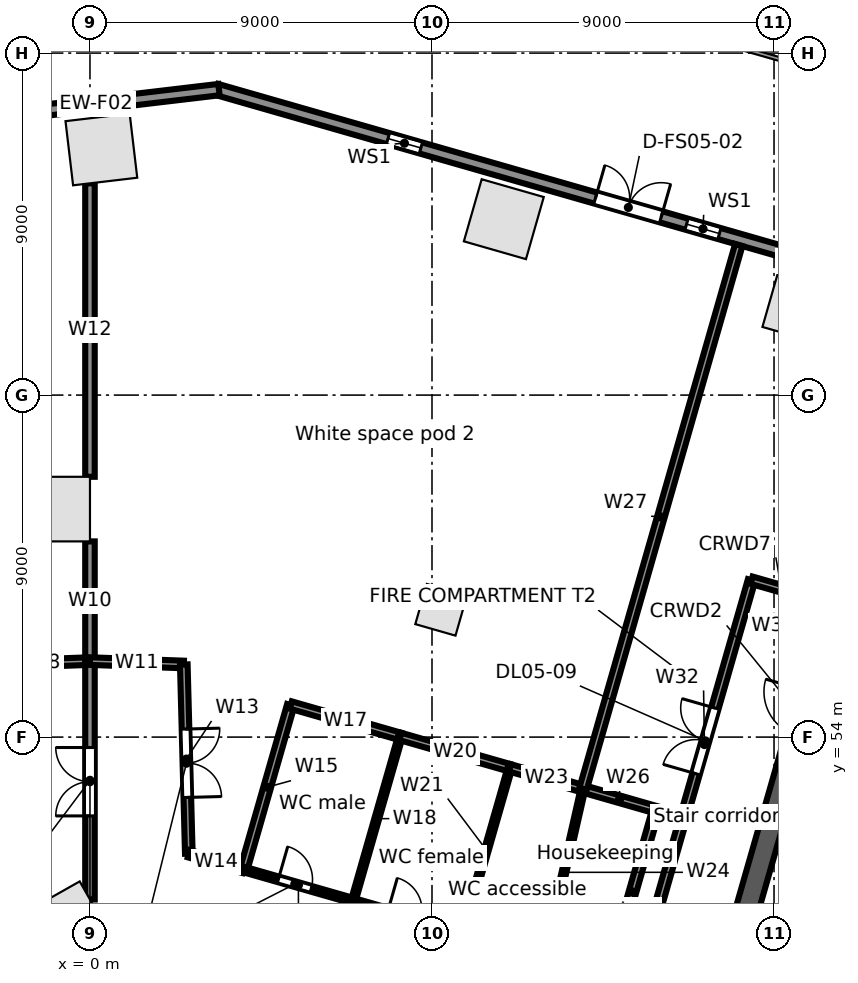
"""IFC4 building model, lengths in metres.
Left out: names, types, materials, properties, quantities, classifications, styles, units other than length and angle.
Written with IfcOpenShell. Run it as: python <this file> out.ifc"""

import sys

from ifc_helpers import new_model, si_unit, direction, frame, frame_2d, origin, origin_2d, place, context, subcontext, project, spatial, rectangle, extrude, element, fill, save


model = new_model("IFC4")
c1 = context("Model", 3, precision=1e-05, world=origin(), true_north=direction((0.0, 1.0)))
c2 = subcontext(c1, "Body", "Model", "MODEL_VIEW")
j1 = project(units=[si_unit("LENGTHUNIT", "METRE"), si_unit("PLANEANGLEUNIT", "RADIAN")], contexts=[c1])
p1 = place(None, origin())
s1 = spatial("IfcSite", under=j1, at=p1, CompositionType="ELEMENT")
p2 = place(p1, origin())
s2 = spatial("IfcBuilding", under=s1, at=p2, CompositionType="ELEMENT")
p3 = place(p2, frame((0.0, 0.0, 26.5)))
s3 = spatial("IfcBuildingStorey", under=s2, at=p3, CompositionType="ELEMENT", Elevation=26.5)
for number, where, z_axis, x_axis in (
    (1, (18.746, 65.376, 0.0), (0.0, 0.0, 1.0), (-0.961, 0.276, 0.0)),
    (2, (10.89, 67.629, 0.0), (0.0, 0.0, 1.0), (-0.961, 0.276, 0.0)),
    (3, (0.3, 69.464, 0.0), (0.0, 0.0, 1.0), (-0.993, -0.118, 0.0)),
    (4, (-0.591, 49.044, 0.0), (0.0, 0.0, 1.0), (0.87, 0.492, 0.0)),
    (5, (-0.85, 60.0, 0.0), (0.0, 0.0, 1.0), (0.0, 1.0, 0.0)),
):
    element("IfcColumn", number, at=place(p3, frame(where, z_axis=z_axis, x_axis=x_axis)), inside=s3, PredefinedType="COLUMN", context=c2, shape_type="SweptSolid", body=[
        extrude(rectangle(XDim=1.7, YDim=1.7, at=origin_2d()), origin(), (0.0, 0.0, 1.0), 5.0),
    ])
p4 = place(p3, frame((9.241, 57.35, 0.0), z_axis=(0.0, 0.0, 1.0), x_axis=(0.961261695938, -0.275637355817, 0.0)))
e6 = element("IfcColumn", 6, at=p4, inside=s3, PredefinedType="COLUMN", context=c2, shape_type="SweptSolid", body=[
    extrude(rectangle(XDim=1.1, YDim=1.1, at=origin_2d()), origin(), (0.0, 0.0, 1.0), 5.0),
])
p5 = place(p3, frame((3.335, 71.044, 0.0), z_axis=(0.0, 0.0, 1.0), x_axis=(0.961260130989, -0.275642813387, 0.0)))
e7 = element("IfcWall", 7, at=p5, inside=s3, PredefinedType="STANDARD", context=c2, shape_type="SweptSolid", body=[
    extrude(rectangle(XDim=32.741, YDim=0.3, at=frame_2d((16.371, 0.0))), origin(), (0.0, 0.0, 1.0), 4.68),
])
p6 = place(p5, frame((29.207, 0.0, 0.6)))
e8 = element("IfcOpeningElement", 8, at=p6, cuts=e7, PredefinedType="OPENING", context=c2, shape_type="SweptSolid", body=[
    extrude(rectangle(XDim=0.9, YDim=3.2, at=frame_2d((0.45, 1.6))), frame((0.0, 0.16, 0.0), z_axis=(0.0, -1.0, 0.0), x_axis=(1.0, 0.0, 0.0)), (0.0, 0.0, 1.0), 0.32),
])
p7 = place(p5, frame((21.034, 0.0, 0.6)))
e9 = element("IfcOpeningElement", 9, at=p7, cuts=e7, PredefinedType="OPENING", context=c2, shape_type="SweptSolid", body=[
    extrude(rectangle(XDim=0.9, YDim=3.2, at=frame_2d((0.45, 1.6))), frame((0.0, 0.16, 0.0), z_axis=(0.0, -1.0, 0.0), x_axis=(1.0, 0.0, 0.0)), (0.0, 0.0, 1.0), 0.32),
])
p8 = place(p5, frame((18.541, 0.0, 0.0)))
e10 = element("IfcOpeningElement", 10, at=p8, cuts=e7, PredefinedType="OPENING", context=c2, shape_type="SweptSolid", body=[
    extrude(rectangle(XDim=1.8, YDim=2.4, at=frame_2d((0.9, 1.2))), frame((0.0, 0.16, 0.0), z_axis=(0.0, -1.0, 0.0), x_axis=(1.0, 0.0, 0.0)), (0.0, 0.0, 1.0), 0.32),
])
p9 = place(p5, frame((12.861, 0.0, 0.6)))
e11 = element("IfcOpeningElement", 11, at=p9, cuts=e7, PredefinedType="OPENING", context=c2, shape_type="SweptSolid", body=[
    extrude(rectangle(XDim=0.9, YDim=3.2, at=frame_2d((0.45, 1.6))), frame((0.0, 0.16, 0.0), z_axis=(0.0, -1.0, 0.0), x_axis=(1.0, 0.0, 0.0)), (0.0, 0.0, 1.0), 0.32),
])
p10 = place(p5, frame((10.368, 0.0, 0.0)))
e12 = element("IfcOpeningElement", 12, at=p10, cuts=e7, PredefinedType="OPENING", context=c2, shape_type="SweptSolid", body=[
    extrude(rectangle(XDim=1.8, YDim=2.4, at=frame_2d((0.9, 1.2))), frame((0.0, 0.16, 0.0), z_axis=(0.0, -1.0, 0.0), x_axis=(1.0, 0.0, 0.0)), (0.0, 0.0, 1.0), 0.32),
])
p11 = place(p5, frame((4.688, 0.0, 0.6)))
e13 = element("IfcOpeningElement", 13, at=p11, cuts=e7, PredefinedType="OPENING", context=c2, shape_type="SweptSolid", body=[
    extrude(rectangle(XDim=0.9, YDim=3.2, at=frame_2d((0.45, 1.6))), frame((0.0, 0.16, 0.0), z_axis=(0.0, -1.0, 0.0), x_axis=(1.0, 0.0, 0.0)), (0.0, 0.0, 1.0), 0.32),
])
p12 = place(p3, frame((-3.076, 70.273, 0.0), z_axis=(0.0, 0.0, 1.0), x_axis=(0.993067743007, 0.117543429416, 0.0)))
e14 = element("IfcWall", 14, at=p12, inside=s3, PredefinedType="STANDARD", context=c2, shape_type="SweptSolid", body=[
    extrude(rectangle(XDim=6.516, YDim=0.3, at=frame_2d((3.258, 0.0))), origin(), (0.0, 0.0, 1.0), 4.68),
])
p13 = place(p3, frame((17.282, 49.427, 0.0), z_axis=(0.0, 0.0, 1.0), x_axis=(0.275631631629, 0.961263337304, 0.0)))
e15 = element("IfcWall", 15, at=p13, inside=s3, PredefinedType="SOLIDWALL", context=c2, shape_type="SweptSolid", body=[
    extrude(rectangle(XDim=10.8, YDim=0.6, at=frame_2d((5.4, 0.0))), origin(), (0.0, 0.0, 1.0), 4.68),
])
p14 = place(p13, frame((4.8, 0.0, 0.0)))
e16 = element("IfcOpeningElement", 16, at=p14, cuts=e15, PredefinedType="OPENING", context=c2, shape_type="SweptSolid", body=[
    extrude(rectangle(XDim=1.2, YDim=2.1, at=frame_2d((0.6, 1.05))), frame((0.0, 0.31, 0.0), z_axis=(0.0, -1.0, 0.0), x_axis=(1.0, 0.0, 0.0)), (0.0, 0.0, 1.0), 0.62),
])
p15 = place(p3, frame((-2.67, 55.904, 0.0), z_axis=(0.0, 0.0, 1.0), x_axis=(0.999354913865, 0.03591317494, 0.0)))
e17 = element("IfcWall", 17, at=p15, inside=s3, PredefinedType="PARTITIONING", context=c2, shape_type="SweptSolid", body=[
    extrude(rectangle(XDim=2.672, YDim=0.2, at=frame_2d((1.336, 0.0))), origin(), (0.0, 0.0, 1.0), 3.742),
])
p16 = place(p3, frame((0.0, 49.726, 0.0), z_axis=(0.0, 0.0, 1.0), x_axis=(0.0, 1.0, 0.0)))
e18 = element("IfcWall", 18, at=p16, inside=s3, PredefinedType="PARTITIONING", context=c2, shape_type="SweptSolid", body=[
    extrude(rectangle(XDim=6.274, YDim=0.25, at=frame_2d((3.137, 0.0))), origin(), (0.0, 0.0, 1.0), 4.68),
])
p17 = place(p16, frame((2.2, 0.0, 0.0)))
e19 = element("IfcOpeningElement", 19, at=p17, cuts=e18, PredefinedType="OPENING", context=c2, shape_type="SweptSolid", body=[
    extrude(rectangle(XDim=1.8, YDim=2.1, at=frame_2d((0.9, 1.05))), frame((0.0, 0.135, 0.0), z_axis=(0.0, -1.0, 0.0), x_axis=(1.0, 0.0, 0.0)), (0.0, 0.0, 1.0), 0.27),
])
p18 = place(p3, frame((0.0, 56.0, 0.0), z_axis=(0.0, 0.0, 1.0), x_axis=(0.0, 1.0, 0.0)))
e20 = element("IfcWall", 20, at=p18, inside=s3, PredefinedType="PARTITIONING", context=c2, shape_type="SweptSolid", body=[
    extrude(rectangle(XDim=3.15, YDim=0.25, at=frame_2d((1.575, 0.0))), origin(), (0.0, 0.0, 1.0), 4.68),
])
p19 = place(p3, frame((0.0, 56.0, 0.0), z_axis=(0.0, 0.0, 1.0), x_axis=(0.999349313684, -0.036068673934, 0.0)))
e21 = element("IfcWall", 21, at=p19, inside=s3, PredefinedType="PARTITIONING", context=c2, shape_type="SweptSolid", body=[
    extrude(rectangle(XDim=2.471, YDim=0.2, at=frame_2d((1.235, 0.0))), origin(), (0.0, 0.0, 1.0), 4.68),
])
p20 = place(p3, frame((0.0, 60.85, 0.0), z_axis=(0.0, 0.0, 1.0), x_axis=(0.0, 1.0, 0.0)))
e22 = element("IfcWall", 22, at=p20, inside=s3, PredefinedType="PARTITIONING", context=c2, shape_type="SweptSolid", body=[
    extrude(rectangle(XDim=7.723, YDim=0.25, at=frame_2d((3.861, 0.0))), origin(), (0.0, 0.0, 1.0), 3.952),
])
p21 = place(p3, frame((2.469, 55.911, 0.0), z_axis=(0.0, 0.0, 1.0), x_axis=(0.02651808123, -0.999648333849, 0.0)))
e23 = element("IfcWall", 23, at=p21, inside=s3, PredefinedType="PARTITIONING", context=c2, shape_type="SweptSolid", body=[
    extrude(rectangle(XDim=4.981, YDim=0.2, at=frame_2d((2.49, 0.0))), origin(), (0.0, 0.0, 1.0), 4.68),
])
p22 = place(p21, frame((1.7, 0.0, 0.0)))
e24 = element("IfcOpeningElement", 24, at=p22, cuts=e23, PredefinedType="OPENING", context=c2, shape_type="SweptSolid", body=[
    extrude(rectangle(XDim=1.8, YDim=2.1, at=frame_2d((0.9, 1.05))), frame((0.0, 0.11, 0.0), z_axis=(0.0, -1.0, 0.0), x_axis=(1.0, 0.0, 0.0)), (0.0, 0.0, 1.0), 0.22),
])
p23 = place(p3, frame((2.601, 50.932, 0.0), z_axis=(0.0, 0.0, 1.0), x_axis=(0.961197773994, -0.27586018065, 0.0)))
e25 = element("IfcWall", 25, at=p23, inside=s3, PredefinedType="PARTITIONING", context=c2, shape_type="SweptSolid", body=[
    extrude(rectangle(XDim=1.5, YDim=0.2, at=frame_2d((0.75, 0.0))), origin(), (0.0, 0.0, 1.0), 4.68),
])
p24 = place(p3, frame((4.043, 50.518, 0.0), z_axis=(0.0, 0.0, 1.0), x_axis=(0.275745553681, 0.96123066411, 0.0)))
e26 = element("IfcWall", 26, at=p24, inside=s3, PredefinedType="PARTITIONING", context=c2, shape_type="SweptSolid", body=[
    extrude(rectangle(XDim=4.5, YDim=0.2, at=frame_2d((2.25, 0.0))), origin(), (0.0, 0.0, 1.0), 4.68),
])
p25 = place(p3, frame((4.043, 50.518, 0.0), z_axis=(0.0, 0.0, 1.0), x_axis=(0.961247103494, -0.275688240636, 0.0)))
e27 = element("IfcWall", 27, at=p25, inside=s3, PredefinedType="PARTITIONING", context=c2, shape_type="SweptSolid", body=[
    extrude(rectangle(XDim=3.0, YDim=0.15, at=frame_2d((1.5, 0.0))), origin(), (0.0, 0.0, 1.0), 4.68),
])
p26 = place(p25, frame((0.95, 0.0, 0.0)))
e28 = element("IfcOpeningElement", 28, at=p26, cuts=e27, PredefinedType="OPENING", context=c2, shape_type="SweptSolid", body=[
    extrude(rectangle(XDim=0.9, YDim=2.1, at=frame_2d((0.45, 1.05))), frame((0.0, 0.085, 0.0), z_axis=(0.0, -1.0, 0.0), x_axis=(1.0, 0.0, 0.0)), (0.0, 0.0, 1.0), 0.17),
])
p27 = place(p3, frame((5.284, 54.844, 0.0), z_axis=(0.0, 0.0, 1.0), x_axis=(0.961243927922, -0.275699312717, 0.0)))
e29 = element("IfcWall", 29, at=p27, inside=s3, PredefinedType="PARTITIONING", context=c2, shape_type="SweptSolid", body=[
    extrude(rectangle(XDim=2.999, YDim=0.2, at=frame_2d((1.5, 0.0))), origin(), (0.0, 0.0, 1.0), 4.68),
])
p28 = place(p3, frame((6.927, 49.691, 0.0), z_axis=(0.0, 0.0, 1.0), x_axis=(0.275530671241, 0.961292280841, 0.0)))
e30 = element("IfcWall", 30, at=p28, inside=s3, PredefinedType="PARTITIONING", context=c2, shape_type="SweptSolid", body=[
    extrude(rectangle(XDim=4.5, YDim=0.125, at=frame_2d((2.25, 0.0))), origin(), (0.0, 0.0, 1.0), 4.68),
])
p29 = place(p3, frame((6.927, 49.691, 0.0), z_axis=(0.0, 0.0, 1.0), x_axis=(0.961268664977, -0.27561305073, 0.0)))
e31 = element("IfcWall", 31, at=p29, inside=s3, PredefinedType="PARTITIONING", context=c2, shape_type="SweptSolid", body=[
    extrude(rectangle(XDim=3.0, YDim=0.15, at=frame_2d((1.5, 0.0))), origin(), (0.0, 0.0, 1.0), 3.742),
])
p30 = place(p29, frame((0.95, 0.0, 0.0)))
e32 = element("IfcOpeningElement", 32, at=p30, cuts=e31, PredefinedType="OPENING", context=c2, shape_type="SweptSolid", body=[
    extrude(rectangle(XDim=0.9, YDim=2.1, at=frame_2d((0.45, 1.05))), frame((0.0, 0.085, 0.0), z_axis=(0.0, -1.0, 0.0), x_axis=(1.0, 0.0, 0.0)), (0.0, 0.0, 1.0), 0.17),
])
p31 = place(p3, frame((8.167, 54.017, 0.0), z_axis=(0.0, 0.0, 1.0), x_axis=(0.961247103494, -0.275688240636, 0.0)))
e33 = element("IfcWall", 33, at=p31, inside=s3, PredefinedType="PARTITIONING", context=c2, shape_type="SweptSolid", body=[
    extrude(rectangle(XDim=3.0, YDim=0.2, at=frame_2d((1.5, 0.0))), origin(), (0.0, 0.0, 1.0), 3.742),
])
p32 = place(p3, frame((9.811, 48.864, 0.0), z_axis=(0.0, 0.0, 1.0), x_axis=(0.275545040649, 0.96128816209, 0.0)))
e34 = element("IfcWall", 34, at=p32, inside=s3, PredefinedType="PARTITIONING", context=c2, shape_type="SweptSolid", body=[
    extrude(rectangle(XDim=4.5, YDim=0.125, at=frame_2d((2.25, 0.0))), origin(), (0.0, 0.0, 1.0), 4.68),
])
p33 = place(p3, frame((11.051, 53.19, 0.0), z_axis=(0.0, 0.0, 1.0), x_axis=(0.961316434736, -0.275446387355, 0.0)))
e35 = element("IfcWall", 35, at=p33, inside=s3, PredefinedType="PARTITIONING", context=c2, shape_type="SweptSolid", body=[
    extrude(rectangle(XDim=2.0, YDim=0.2, at=frame_2d((1.0, 0.0))), origin(), (0.0, 0.0, 1.0), 4.68),
])
p34 = place(p3, frame((11.973, 48.244, 0.0), z_axis=(0.0, 0.0, 1.0), x_axis=(0.222117362571, 0.975019936845, 0.0)))
e36 = element("IfcWall", 36, at=p34, inside=s3, PredefinedType="PARTITIONING", context=c2, shape_type="SweptSolid", body=[
    extrude(rectangle(XDim=4.508, YDim=0.125, at=frame_2d((2.254, 0.0))), origin(), (0.0, 0.0, 1.0), 4.68),
])
p35 = place(p3, frame((12.974, 52.639, 0.0), z_axis=(0.0, 0.0, 1.0), x_axis=(0.961270097305, -0.275608055084, 0.0)))
e37 = element("IfcWall", 37, at=p35, inside=s3, PredefinedType="PARTITIONING", context=c2, shape_type="SweptSolid", body=[
    extrude(rectangle(XDim=1.999, YDim=0.2, at=frame_2d((1.0, 0.0))), origin(), (0.0, 0.0, 1.0), 4.68),
])
p36 = place(p3, frame((12.974, 52.639, 0.0), z_axis=(0.0, 0.0, 1.0), x_axis=(0.275299463768, 0.961358520662, 0.0)))
e38 = element("IfcWall", 38, at=p36, inside=s3, PredefinedType="PARTITIONING", context=c2, shape_type="SweptSolid", body=[
    extrude(rectangle(XDim=14.885, YDim=0.2, at=frame_2d((7.443, 0.0))), origin(), (0.0, 0.0, 1.0), 3.742),
])
p37 = place(p3, frame((13.656, 47.762, 0.0), z_axis=(0.0, 0.0, 1.0), x_axis=(0.275545040649, 0.96128816209, 0.0)))
e39 = element("IfcWall", 39, at=p37, inside=s3, PredefinedType="PARTITIONING", context=c2, shape_type="SweptSolid", body=[
    extrude(rectangle(XDim=4.5, YDim=0.2, at=frame_2d((2.25, 0.0))), origin(), (0.0, 0.0, 1.0), 4.68),
])
p38 = place(p3, frame((14.928, 49.478, 0.0), z_axis=(0.0, 0.0, 1.0), x_axis=(0.275674053528, 0.961251172281, 0.0)))
e40 = element("IfcWall", 40, at=p38, inside=s3, PredefinedType="PARTITIONING", context=c2, shape_type="SweptSolid", body=[
    extrude(rectangle(XDim=9.0, YDim=0.2, at=frame_2d((4.5, 0.0))), origin(), (0.0, 0.0, 1.0), 3.742),
])
p39 = place(p38, frame((3.7, 0.0, 0.0)))
e41 = element("IfcOpeningElement", 41, at=p39, cuts=e40, PredefinedType="OPENING", context=c2, shape_type="SweptSolid", body=[
    extrude(rectangle(XDim=1.8, YDim=2.1, at=frame_2d((0.9, 1.05))), frame((0.0, 0.11, 0.0), z_axis=(0.0, -1.0, 0.0), x_axis=(1.0, 0.0, 0.0)), (0.0, 0.0, 1.0), 0.22),
])
p40 = place(p3, frame((17.409, 58.129, 0.0), z_axis=(0.0, 0.0, 1.0), x_axis=(0.961253165474, -0.275667103345, 0.0)))
e42 = element("IfcWall", 42, at=p40, inside=s3, PredefinedType="PARTITIONING", context=c2, shape_type="SweptSolid", body=[
    extrude(rectangle(XDim=1.977, YDim=0.2, at=frame_2d((0.988, 0.0))), origin(), (0.0, 0.0, 1.0), 4.68),
])
p41 = place(p9, origin())
e43 = element("IfcWindow", 43, at=p41, inside=s3, PartitioningType="SINGLE_PANEL", PredefinedType="WINDOW", context=c2, shape_type="SweptSolid", body=[
    extrude(rectangle(XDim=0.9, YDim=3.2, at=frame_2d((0.45, 1.6))), frame((0.0, 0.03, 0.0), z_axis=(0.0, -1.0, 0.0), x_axis=(1.0, 0.0, 0.0)), (0.0, 0.0, 1.0), 0.06),
])
fill(e11, e43)
p42 = place(p10, origin())
e44 = element("IfcDoor", 44, at=p42, inside=s3, OperationType="DOUBLE_DOOR_SINGLE_SWING", PredefinedType="DOOR", context=c2, shape_type="SweptSolid", body=[
    extrude(rectangle(XDim=1.8, YDim=2.4, at=frame_2d((0.9, 1.2))), frame((0.0, 0.025, 0.0), z_axis=(0.0, -1.0, 0.0), x_axis=(1.0, 0.0, 0.0)), (0.0, 0.0, 1.0), 0.05),
])
fill(e12, e44)
p43 = place(p11, origin())
e45 = element("IfcWindow", 45, at=p43, inside=s3, PartitioningType="SINGLE_PANEL", PredefinedType="WINDOW", context=c2, shape_type="SweptSolid", body=[
    extrude(rectangle(XDim=0.9, YDim=3.2, at=frame_2d((0.45, 1.6))), frame((0.0, 0.03, 0.0), z_axis=(0.0, -1.0, 0.0), x_axis=(1.0, 0.0, 0.0)), (0.0, 0.0, 1.0), 0.06),
])
fill(e13, e45)
p44 = place(p26, origin())
e46 = element("IfcDoor", 46, at=p44, inside=s3, OperationType="SINGLE_SWING_LEFT", PredefinedType="DOOR", context=c2, shape_type="SweptSolid", body=[
    extrude(rectangle(XDim=0.9, YDim=2.1, at=frame_2d((0.45, 1.05))), frame((0.0, 0.025, 0.0), z_axis=(0.0, -1.0, 0.0), x_axis=(1.0, 0.0, 0.0)), (0.0, 0.0, 1.0), 0.05),
])
fill(e28, e46)
p45 = place(p22, origin())
e47 = element("IfcDoor", 47, at=p45, inside=s3, OperationType="DOUBLE_DOOR_SINGLE_SWING", PredefinedType="DOOR", context=c2, shape_type="SweptSolid", body=[
    extrude(rectangle(XDim=1.8, YDim=2.1, at=frame_2d((0.9, 1.05))), frame((0.0, 0.025, 0.0), z_axis=(0.0, -1.0, 0.0), x_axis=(1.0, 0.0, 0.0)), (0.0, 0.0, 1.0), 0.05),
])
fill(e24, e47)
p46 = place(p39, origin())
e48 = element("IfcDoor", 48, at=p46, inside=s3, OperationType="DOUBLE_DOOR_SINGLE_SWING", PredefinedType="DOOR", context=c2, shape_type="SweptSolid", body=[
    extrude(rectangle(XDim=1.8, YDim=2.1, at=frame_2d((0.9, 1.05))), frame((0.0, 0.025, 0.0), z_axis=(0.0, -1.0, 0.0), x_axis=(1.0, 0.0, 0.0)), (0.0, 0.0, 1.0), 0.05),
])
fill(e41, e48)
p47 = place(p17, origin())
e49 = element("IfcDoor", 49, at=p47, inside=s3, OperationType="DOUBLE_DOOR_SINGLE_SWING", PredefinedType="DOOR", context=c2, shape_type="SweptSolid", body=[
    extrude(rectangle(XDim=1.8, YDim=2.1, at=frame_2d((0.9, 1.05))), frame((0.0, 0.025, 0.0), z_axis=(0.0, -1.0, 0.0), x_axis=(1.0, 0.0, 0.0)), (0.0, 0.0, 1.0), 0.05),
])
fill(e19, e49)
save(model, sys.argv[1])
